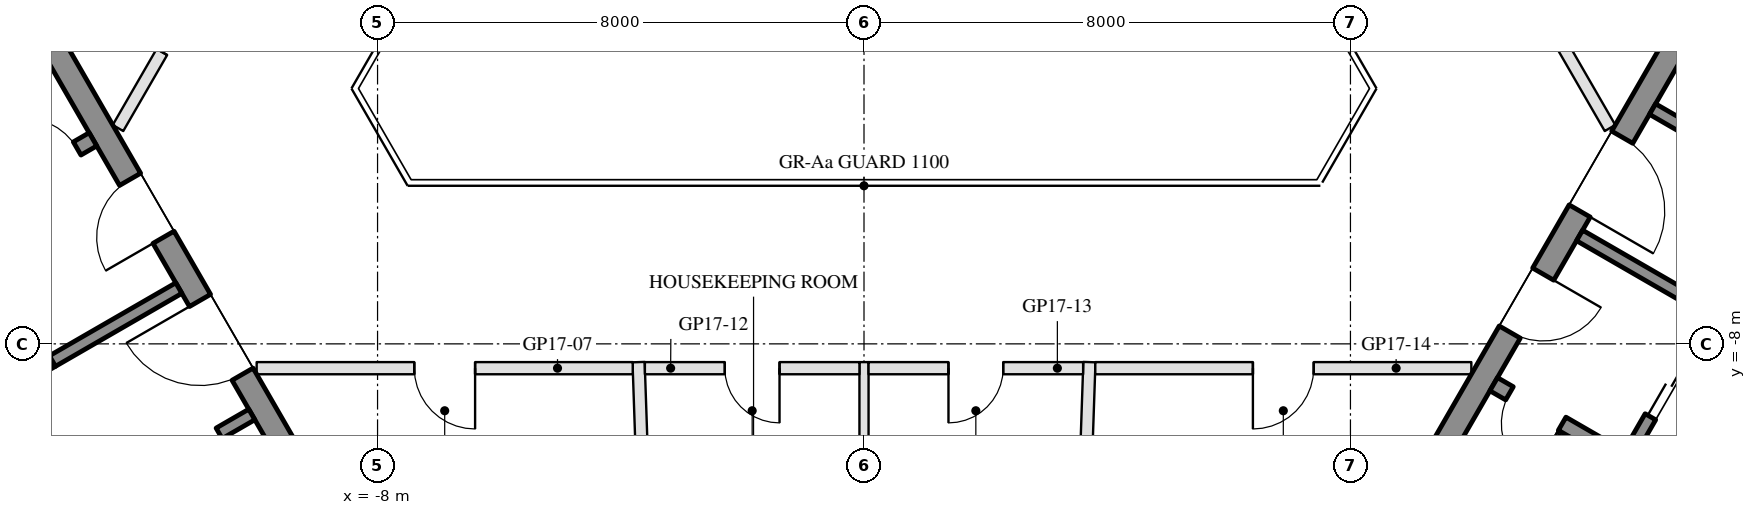
"""IFC4 building model, lengths in metres.
Left out: names, types, materials, properties, quantities, classifications, styles, units other than length and angle.
Written with IfcOpenShell. Run it as: python <this file> out.ifc"""

import sys

from ifc_helpers import new_model, si_unit, direction, frame, frame_2d, origin, place, context, subcontext, project, spatial, rectangle, extrude, element, fill, save


model = new_model("IFC4")
c1 = context("Model", 3, precision=1e-05, world=origin(), true_north=direction((0.0, 1.0)))
c2 = subcontext(c1, "Body", "Model", "MODEL_VIEW")
j1 = project(units=[si_unit("LENGTHUNIT", "METRE"), si_unit("PLANEANGLEUNIT", "RADIAN")], contexts=[c1])
p1 = place(None, origin())
s1 = spatial("IfcSite", under=j1, at=p1, CompositionType="ELEMENT")
p2 = place(p1, origin())
s2 = spatial("IfcBuilding", under=s1, at=p2, CompositionType="ELEMENT")
p3 = place(p2, frame((0.0, 0.0, 187.3)))
s3 = spatial("IfcBuildingStorey", under=s2, at=p3, CompositionType="ELEMENT", Elevation=187.3)
p4 = place(p3, frame((-13.845, -2.22, 0.0), z_axis=(0.0, 0.0, 1.0), x_axis=(0.500004234368, -0.866022959057, 0.0)))
e1 = element("IfcWall", 1, at=p4, inside=s3, PredefinedType="SHEAR", context=c2, shape_type="SweptSolid", body=[
    extrude(rectangle(XDim=10.0, YDim=0.4, at=frame_2d((5.0, 0.0))), origin(), (0.0, 0.0, 1.0), 3.5),
])
p5 = place(p4, frame((3.55, 0.0, 0.0)))
e2 = element("IfcOpeningElement", 2, at=p5, cuts=e1, PredefinedType="OPENING", context=c2, shape_type="SweptSolid", body=[
    extrude(rectangle(XDim=1.1, YDim=2.1, at=frame_2d((0.55, 1.05))), frame((0.0, 0.21, 0.0), z_axis=(0.0, -1.0, 0.0), x_axis=(1.0, 0.0, 0.0)), (0.0, 0.0, 1.0), 0.42),
])
p6 = place(p4, frame((5.85, 0.0, 0.0)))
e3 = element("IfcOpeningElement", 3, at=p6, cuts=e1, PredefinedType="OPENING", context=c2, shape_type="SweptSolid", body=[
    extrude(rectangle(XDim=1.4, YDim=2.1, at=frame_2d((0.7, 1.05))), frame((0.0, 0.21, 0.0), z_axis=(0.0, -1.0, 0.0), x_axis=(1.0, 0.0, 0.0)), (0.0, 0.0, 1.0), 0.42),
])
p7 = place(p3, frame((-12.681, -4.636, 0.0), z_axis=(0.0, 0.0, 1.0), x_axis=(-0.866021702275, -0.500006411147, 0.0)))
e4 = element("IfcWall", 4, at=p7, inside=s3, PredefinedType="SHEAR", context=c2, shape_type="SweptSolid", body=[
    extrude(rectangle(XDim=6.45, YDim=0.25, at=frame_2d((3.225, 0.0))), origin(), (0.0, 0.0, 1.0), 3.5),
])
p8 = place(p7, frame((0.3, 0.0, 0.0)))
e5 = element("IfcOpeningElement", 5, at=p8, cuts=e4, PredefinedType="OPENING", context=c2, shape_type="SweptSolid", body=[
    extrude(rectangle(XDim=1.0, YDim=2.1, at=frame_2d((0.5, 1.05))), frame((0.0, 0.135, 0.0), z_axis=(0.0, -1.0, 0.0), x_axis=(1.0, 0.0, 0.0)), (0.0, 0.0, 1.0), 0.27),
])
p9 = place(p3, frame((-14.783, -5.995, 0.0), z_axis=(0.0, 0.0, 1.0), x_axis=(0.49994636267, -0.866056369097, 0.0)))
e6 = element("IfcWall", 6, at=p9, inside=s3, PredefinedType="SHEAR", context=c2, shape_type="SweptSolid", body=[
    extrude(rectangle(XDim=2.8, YDim=0.2, at=frame_2d((1.4, 0.0))), origin(), (0.0, 0.0, 1.0), 3.5),
])
p10 = place(p9, frame((0.7, 0.0, 0.0)))
e7 = element("IfcOpeningElement", 7, at=p10, cuts=e6, PredefinedType="OPENING", context=c2, shape_type="SweptSolid", body=[
    extrude(rectangle(XDim=1.2, YDim=2.1, at=frame_2d((0.6, 1.05))), frame((0.0, 0.11, 0.0), z_axis=(0.0, -1.0, 0.0), x_axis=(1.0, 0.0, 0.0)), (0.0, 0.0, 1.0), 0.22),
])
p11 = place(p3, frame((-11.268, -7.083, 0.0), z_axis=(0.0, 0.0, 1.0), x_axis=(-0.866050077142, -0.499957262057, 0.0)))
e8 = element("IfcWall", 8, at=p11, inside=s3, PredefinedType="SHEAR", context=c2, shape_type="SweptSolid", body=[
    extrude(rectangle(XDim=2.4, YDim=0.2, at=frame_2d((1.2, 0.0))), origin(), (0.0, 0.0, 1.0), 3.5),
])
p12 = place(p3, frame((-10.068, -9.162, 0.0), z_axis=(0.0, 0.0, 1.0), x_axis=(-0.866032725843, -0.499987317609, 0.0)))
e9 = element("IfcWall", 9, at=p12, inside=s3, PredefinedType="SHEAR", context=c2, shape_type="SweptSolid", body=[
    extrude(rectangle(XDim=10.16, YDim=0.2, at=frame_2d((5.08, 0.0))), origin(), (0.0, 0.0, 1.0), 3.5),
])
p13 = place(p12, frame((0.62, 0.0, 0.0)))
e10 = element("IfcOpeningElement", 10, at=p13, cuts=e9, PredefinedType="OPENING", context=c2, shape_type="SweptSolid", body=[
    extrude(rectangle(XDim=1.1, YDim=2.1, at=frame_2d((0.55, 1.05))), frame((0.0, 0.11, 0.0), z_axis=(0.0, -1.0, 0.0), x_axis=(1.0, 0.0, 0.0)), (0.0, 0.0, 1.0), 0.22),
])
p14 = place(p12, frame((3.16, 0.0, 0.0)))
e11 = element("IfcOpeningElement", 11, at=p14, cuts=e9, PredefinedType="OPENING", context=c2, shape_type="SweptSolid", body=[
    extrude(rectangle(XDim=1.1, YDim=2.1, at=frame_2d((0.55, 1.05))), frame((0.0, 0.11, 0.0), z_axis=(0.0, -1.0, 0.0), x_axis=(1.0, 0.0, 0.0)), (0.0, 0.0, 1.0), 0.22),
])
p15 = place(p12, frame((5.7, 0.0, 0.0)))
e12 = element("IfcOpeningElement", 12, at=p15, cuts=e9, PredefinedType="OPENING", context=c2, shape_type="SweptSolid", body=[
    extrude(rectangle(XDim=1.1, YDim=2.1, at=frame_2d((0.55, 1.05))), frame((0.0, 0.11, 0.0), z_axis=(0.0, -1.0, 0.0), x_axis=(1.0, 0.0, 0.0)), (0.0, 0.0, 1.0), 0.22),
])
p16 = place(p12, frame((8.24, 0.0, 0.0)))
e13 = element("IfcOpeningElement", 13, at=p16, cuts=e9, PredefinedType="OPENING", context=c2, shape_type="SweptSolid", body=[
    extrude(rectangle(XDim=1.1, YDim=2.1, at=frame_2d((0.55, 1.05))), frame((0.0, 0.11, 0.0), z_axis=(0.0, -1.0, 0.0), x_axis=(1.0, 0.0, 0.0)), (0.0, 0.0, 1.0), 0.22),
])
p17 = place(p3, frame((8.845, -10.88, 0.0), z_axis=(0.0, 0.0, 1.0), x_axis=(0.500004234368, 0.866022959057, 0.0)))
e14 = element("IfcWall", 14, at=p17, inside=s3, PredefinedType="SHEAR", context=c2, shape_type="SweptSolid", body=[
    extrude(rectangle(XDim=10.0, YDim=0.4, at=frame_2d((5.0, 0.0))), origin(), (0.0, 0.0, 1.0), 3.5),
])
p18 = place(p17, frame((3.55, 0.0, 0.0)))
e15 = element("IfcOpeningElement", 15, at=p18, cuts=e14, PredefinedType="OPENING", context=c2, shape_type="SweptSolid", body=[
    extrude(rectangle(XDim=1.1, YDim=2.1, at=frame_2d((0.55, 1.05))), frame((0.0, 0.21, 0.0), z_axis=(0.0, -1.0, 0.0), x_axis=(1.0, 0.0, 0.0)), (0.0, 0.0, 1.0), 0.42),
])
p19 = place(p17, frame((5.85, 0.0, 0.0)))
e16 = element("IfcOpeningElement", 16, at=p19, cuts=e14, PredefinedType="OPENING", context=c2, shape_type="SweptSolid", body=[
    extrude(rectangle(XDim=1.4, YDim=2.1, at=frame_2d((0.7, 1.05))), frame((0.0, 0.21, 0.0), z_axis=(0.0, -1.0, 0.0), x_axis=(1.0, 0.0, 0.0)), (0.0, 0.0, 1.0), 0.42),
])
p20 = place(p3, frame((10.356, -8.664, 0.0), z_axis=(0.0, 0.0, 1.0), x_axis=(0.866028629588, -0.499994412703, 0.0)))
e17 = element("IfcWall", 17, at=p20, inside=s3, PredefinedType="SHEAR", context=c2, shape_type="SweptSolid", body=[
    extrude(rectangle(XDim=6.45, YDim=0.25, at=frame_2d((3.225, 0.0))), origin(), (0.0, 0.0, 1.0), 3.5),
])
p21 = place(p20, frame((0.3, 0.0, 0.0)))
e18 = element("IfcOpeningElement", 18, at=p21, cuts=e17, PredefinedType="OPENING", context=c2, shape_type="SweptSolid", body=[
    extrude(rectangle(XDim=1.0, YDim=2.1, at=frame_2d((0.5, 1.05))), frame((0.0, 0.135, 0.0), z_axis=(0.0, -1.0, 0.0), x_axis=(1.0, 0.0, 0.0)), (0.0, 0.0, 1.0), 0.27),
])
p22 = place(p3, frame((12.583, -9.805, 0.0), z_axis=(0.0, 0.0, 1.0), x_axis=(0.49994636267, 0.866056369097, 0.0)))
e19 = element("IfcWall", 19, at=p22, inside=s3, PredefinedType="SHEAR", context=c2, shape_type="SweptSolid", body=[
    extrude(rectangle(XDim=2.8, YDim=0.2, at=frame_2d((1.4, 0.0))), origin(), (0.0, 0.0, 1.0), 3.5),
])
p23 = place(p22, frame((0.7, 0.0, 0.0)))
e20 = element("IfcOpeningElement", 20, at=p23, cuts=e19, PredefinedType="OPENING", context=c2, shape_type="SweptSolid", body=[
    extrude(rectangle(XDim=1.2, YDim=2.1, at=frame_2d((0.6, 1.05))), frame((0.0, 0.11, 0.0), z_axis=(0.0, -1.0, 0.0), x_axis=(1.0, 0.0, 0.0)), (0.0, 0.0, 1.0), 0.22),
])
p24 = place(p3, frame((11.768, -6.217, 0.0), z_axis=(0.0, 0.0, 1.0), x_axis=(0.866050077142, -0.499957262057, 0.0)))
e21 = element("IfcWall", 21, at=p24, inside=s3, PredefinedType="SHEAR", context=c2, shape_type="SweptSolid", body=[
    extrude(rectangle(XDim=2.4, YDim=0.2, at=frame_2d((1.2, 0.0))), origin(), (0.0, 0.0, 1.0), 3.5),
])
p25 = place(p3, frame((12.968, -4.138, 0.0), z_axis=(0.0, 0.0, 1.0), x_axis=(0.866028328073, -0.49999493495, 0.0)))
e22 = element("IfcWall", 22, at=p25, inside=s3, PredefinedType="SHEAR", context=c2, shape_type="SweptSolid", body=[
    extrude(rectangle(XDim=10.16, YDim=0.2, at=frame_2d((5.08, 0.0))), origin(), (0.0, 0.0, 1.0), 3.5),
])
p26 = place(p25, frame((0.72, 0.0, 0.0)))
e23 = element("IfcOpeningElement", 23, at=p26, cuts=e22, PredefinedType="OPENING", context=c2, shape_type="SweptSolid", body=[
    extrude(rectangle(XDim=0.9, YDim=2.1, at=frame_2d((0.45, 1.05))), frame((0.0, 0.11, 0.0), z_axis=(0.0, -1.0, 0.0), x_axis=(1.0, 0.0, 0.0)), (0.0, 0.0, 1.0), 0.22),
])
p27 = place(p25, frame((5.8, 0.0, 0.0)))
e24 = element("IfcOpeningElement", 24, at=p27, cuts=e22, PredefinedType="OPENING", context=c2, shape_type="SweptSolid", body=[
    extrude(rectangle(XDim=0.9, YDim=2.1, at=frame_2d((0.45, 1.05))), frame((0.0, 0.11, 0.0), z_axis=(0.0, -1.0, 0.0), x_axis=(1.0, 0.0, 0.0)), (0.0, 0.0, 1.0), 0.22),
])
p28 = place(p3, frame((-3.361, -18.38, 0.0), z_axis=(0.0, 0.0, 1.0), x_axis=(-0.034300534927, 0.999411563523, 0.0)))
e25 = element("IfcWall", 25, at=p28, inside=s3, PredefinedType="PARTITIONING", context=c2, shape_type="SweptSolid", body=[
    extrude(rectangle(XDim=10.086, YDim=0.2, at=frame_2d((5.043, 0.0))), origin(), (0.0, 0.0, 1.0), 3.06),
])
p29 = place(p3, frame((3.33, -19.28, 0.0), z_axis=(0.0, 0.0, 1.0), x_axis=(0.034288537327, 0.999411975217, 0.0)))
e26 = element("IfcWall", 26, at=p29, inside=s3, PredefinedType="PARTITIONING", context=c2, shape_type="SweptSolid", body=[
    extrude(rectangle(XDim=10.986, YDim=0.2, at=frame_2d((5.493, 0.0))), origin(), (0.0, 0.0, 1.0), 3.06),
])
p30 = place(p3, frame((-3.803, -8.4, 0.0), z_axis=(0.0, 0.0, 1.0), x_axis=(-1.0, 0.0, 0.0)))
e27 = element("IfcWall", 27, at=p30, inside=s3, PredefinedType="PARTITIONING", context=c2, shape_type="SweptSolid", body=[
    extrude(rectangle(XDim=6.185, YDim=0.2, at=frame_2d((3.092, 0.0))), origin(), (0.0, 0.0, 1.0), 2.95),
])
p31 = place(p30, frame((2.592, 0.0, 0.0)))
e28 = element("IfcOpeningElement", 28, at=p31, cuts=e27, PredefinedType="OPENING", context=c2, shape_type="SweptSolid", body=[
    extrude(rectangle(XDim=1.0, YDim=2.1, at=frame_2d((0.5, 1.05))), frame((0.0, 0.11, 0.0), z_axis=(0.0, -1.0, 0.0), x_axis=(1.0, 0.0, 0.0)), (0.0, 0.0, 1.0), 0.22),
])
p32 = place(p3, frame((0.0, -17.855, 0.0), z_axis=(0.0, 0.0, 1.0), x_axis=(0.0, 1.0, 0.0)))
e29 = element("IfcWall", 29, at=p32, inside=s3, PredefinedType="PARTITIONING", context=c2, shape_type="SweptSolid", body=[
    extrude(rectangle(XDim=9.555, YDim=0.15, at=frame_2d((4.777, 0.0))), origin(), (0.0, 0.0, 1.0), 2.95),
])
p33 = place(p3, frame((-0.075, -8.4, 0.0), z_axis=(0.0, 0.0, 1.0), x_axis=(-1.0, 0.0, 0.0)))
e30 = element("IfcWall", 30, at=p33, inside=s3, PredefinedType="PARTITIONING", context=c2, shape_type="SweptSolid", body=[
    extrude(rectangle(XDim=3.529, YDim=0.2, at=frame_2d((1.764, 0.0))), origin(), (0.0, 0.0, 1.0), 2.95),
])
p34 = place(p33, frame((1.314, 0.0, 0.0)))
e31 = element("IfcOpeningElement", 31, at=p34, cuts=e30, PredefinedType="OPENING", context=c2, shape_type="SweptSolid", body=[
    extrude(rectangle(XDim=0.9, YDim=2.1, at=frame_2d((0.45, 1.05))), frame((0.0, 0.11, 0.0), z_axis=(0.0, -1.0, 0.0), x_axis=(1.0, 0.0, 0.0)), (0.0, 0.0, 1.0), 0.22),
])
p35 = place(p3, frame((3.604, -8.4, 0.0), z_axis=(0.0, 0.0, 1.0), x_axis=(-1.0, 0.0, 0.0)))
e32 = element("IfcWall", 32, at=p35, inside=s3, PredefinedType="PARTITIONING", context=c2, shape_type="SweptSolid", body=[
    extrude(rectangle(XDim=3.529, YDim=0.2, at=frame_2d((1.764, 0.0))), origin(), (0.0, 0.0, 1.0), 2.95),
])
p36 = place(p35, frame((1.314, 0.0, 0.0)))
e33 = element("IfcOpeningElement", 33, at=p36, cuts=e32, PredefinedType="OPENING", context=c2, shape_type="SweptSolid", body=[
    extrude(rectangle(XDim=0.9, YDim=2.1, at=frame_2d((0.45, 1.05))), frame((0.0, 0.11, 0.0), z_axis=(0.0, -1.0, 0.0), x_axis=(1.0, 0.0, 0.0)), (0.0, 0.0, 1.0), 0.22),
])
p37 = place(p3, frame((9.988, -8.4, 0.0), z_axis=(0.0, 0.0, 1.0), x_axis=(-1.0, 0.0, 0.0)))
e34 = element("IfcWall", 34, at=p37, inside=s3, PredefinedType="PARTITIONING", context=c2, shape_type="SweptSolid", body=[
    extrude(rectangle(XDim=6.185, YDim=0.2, at=frame_2d((3.092, 0.0))), origin(), (0.0, 0.0, 1.0), 2.95),
])
p38 = place(p37, frame((2.592, 0.0, 0.0)))
e35 = element("IfcOpeningElement", 35, at=p38, cuts=e34, PredefinedType="OPENING", context=c2, shape_type="SweptSolid", body=[
    extrude(rectangle(XDim=1.0, YDim=2.1, at=frame_2d((0.5, 1.05))), frame((0.0, 0.11, 0.0), z_axis=(0.0, -1.0, 0.0), x_axis=(1.0, 0.0, 0.0)), (0.0, 0.0, 1.0), 0.22),
])
p39 = place(p3, frame((9.725, -0.043, 0.0), z_axis=(0.0, 0.0, 1.0), x_axis=(0.500014573982, -0.866016989329, 0.0)))
e36 = element("IfcWall", 36, at=p39, inside=s3, PredefinedType="PARTITIONING", context=c2, shape_type="SweptSolid", body=[
    extrude(rectangle(XDim=5.088, YDim=0.2, at=frame_2d((2.544, 0.0))), origin(), (0.0, 0.0, 1.0), 2.95),
])
p40 = place(p39, frame((2.044, 0.0, 0.0)))
e37 = element("IfcOpeningElement", 37, at=p40, cuts=e36, PredefinedType="OPENING", context=c2, shape_type="SweptSolid", body=[
    extrude(rectangle(XDim=1.0, YDim=2.1, at=frame_2d((0.5, 1.05))), frame((0.0, 0.11, 0.0), z_axis=(0.0, -1.0, 0.0), x_axis=(1.0, 0.0, 0.0)), (0.0, 0.0, 1.0), 0.22),
])
p41 = place(p3, frame((-12.269, -4.45, 0.0), z_axis=(0.0, 0.0, 1.0), x_axis=(0.500008716408, 0.866020371305, 0.0)))
e38 = element("IfcWall", 38, at=p41, inside=s3, PredefinedType="PARTITIONING", context=c2, shape_type="SweptSolid", body=[
    extrude(rectangle(XDim=3.888, YDim=0.2, at=frame_2d((1.944, 0.0))), origin(), (0.0, 0.0, 1.0), 2.95),
])
p42 = place(p41, frame((1.444, 0.0, 0.0)))
e39 = element("IfcOpeningElement", 39, at=p42, cuts=e38, PredefinedType="OPENING", context=c2, shape_type="SweptSolid", body=[
    extrude(rectangle(XDim=1.0, YDim=2.1, at=frame_2d((0.5, 1.05))), frame((0.0, 0.11, 0.0), z_axis=(0.0, -1.0, 0.0), x_axis=(1.0, 0.0, 0.0)), (0.0, 0.0, 1.0), 0.22),
])
p43 = place(p13, origin())
e40 = element("IfcDoor", 40, at=p43, inside=s3, OperationType="DOUBLE_DOOR_SLIDING", PredefinedType="DOOR", context=c2, shape_type="SweptSolid", body=[
    extrude(rectangle(XDim=1.1, YDim=2.1, at=frame_2d((0.55, 1.05))), frame((0.0, 0.025, 0.0), z_axis=(0.0, -1.0, 0.0), x_axis=(1.0, 0.0, 0.0)), (0.0, 0.0, 1.0), 0.05),
])
fill(e10, e40)
p44 = place(p5, frame((1.1, 0.0, 0.0), z_axis=(0.0, 0.0, 1.0), x_axis=(-1.0, 0.0, 0.0)))
e41 = element("IfcDoor", 41, at=p44, inside=s3, OperationType="SINGLE_SWING_LEFT", PredefinedType="DOOR", context=c2, shape_type="SweptSolid", body=[
    extrude(rectangle(XDim=1.1, YDim=2.1, at=frame_2d((0.55, 1.05))), frame((0.0, 0.025, 0.0), z_axis=(0.0, -1.0, 0.0), x_axis=(1.0, 0.0, 0.0)), (0.0, 0.0, 1.0), 0.05),
])
fill(e2, e41)
p45 = place(p6, frame((1.4, 0.0, 0.0), z_axis=(0.0, 0.0, 1.0), x_axis=(-1.0, 0.0, 0.0)))
e42 = element("IfcDoor", 42, at=p45, inside=s3, OperationType="DOUBLE_DOOR_SINGLE_SWING", PredefinedType="DOOR", context=c2, shape_type="SweptSolid", body=[
    extrude(rectangle(XDim=1.4, YDim=2.1, at=frame_2d((0.7, 1.05))), frame((0.0, 0.025, 0.0), z_axis=(0.0, -1.0, 0.0), x_axis=(1.0, 0.0, 0.0)), (0.0, 0.0, 1.0), 0.05),
])
fill(e3, e42)
p46 = place(p8, frame((1.0, 0.0, 0.0), z_axis=(0.0, 0.0, 1.0), x_axis=(-1.0, 0.0, 0.0)))
e43 = element("IfcDoor", 43, at=p46, inside=s3, OperationType="SINGLE_SWING_LEFT", PredefinedType="DOOR", context=c2, shape_type="SweptSolid", body=[
    extrude(rectangle(XDim=1.0, YDim=2.1, at=frame_2d((0.5, 1.05))), frame((0.0, 0.025, 0.0), z_axis=(0.0, -1.0, 0.0), x_axis=(1.0, 0.0, 0.0)), (0.0, 0.0, 1.0), 0.05),
])
fill(e5, e43)
p47 = place(p23, origin())
e44 = element("IfcDoor", 44, at=p47, inside=s3, OperationType="DOUBLE_DOOR_SLIDING", PredefinedType="DOOR", context=c2, shape_type="SweptSolid", body=[
    extrude(rectangle(XDim=1.2, YDim=2.1, at=frame_2d((0.6, 1.05))), frame((0.0, 0.025, 0.0), z_axis=(0.0, -1.0, 0.0), x_axis=(1.0, 0.0, 0.0)), (0.0, 0.0, 1.0), 0.05),
])
fill(e20, e44)
p48 = place(p18, frame((1.1, 0.0, 0.0), z_axis=(0.0, 0.0, 1.0), x_axis=(-1.0, 0.0, 0.0)))
e45 = element("IfcDoor", 45, at=p48, inside=s3, OperationType="SINGLE_SWING_LEFT", PredefinedType="DOOR", context=c2, shape_type="SweptSolid", body=[
    extrude(rectangle(XDim=1.1, YDim=2.1, at=frame_2d((0.55, 1.05))), frame((0.0, 0.025, 0.0), z_axis=(0.0, -1.0, 0.0), x_axis=(1.0, 0.0, 0.0)), (0.0, 0.0, 1.0), 0.05),
])
fill(e15, e45)
p49 = place(p19, frame((1.4, 0.0, 0.0), z_axis=(0.0, 0.0, 1.0), x_axis=(-1.0, 0.0, 0.0)))
e46 = element("IfcDoor", 46, at=p49, inside=s3, OperationType="DOUBLE_DOOR_SINGLE_SWING", PredefinedType="DOOR", context=c2, shape_type="SweptSolid", body=[
    extrude(rectangle(XDim=1.4, YDim=2.1, at=frame_2d((0.7, 1.05))), frame((0.0, 0.025, 0.0), z_axis=(0.0, -1.0, 0.0), x_axis=(1.0, 0.0, 0.0)), (0.0, 0.0, 1.0), 0.05),
])
fill(e16, e46)
p50 = place(p21, frame((1.0, 0.0, 0.0), z_axis=(0.0, 0.0, 1.0), x_axis=(-1.0, 0.0, 0.0)))
e47 = element("IfcDoor", 47, at=p50, inside=s3, OperationType="SINGLE_SWING_LEFT", PredefinedType="DOOR", context=c2, shape_type="SweptSolid", body=[
    extrude(rectangle(XDim=1.0, YDim=2.1, at=frame_2d((0.5, 1.05))), frame((0.0, 0.025, 0.0), z_axis=(0.0, -1.0, 0.0), x_axis=(1.0, 0.0, 0.0)), (0.0, 0.0, 1.0), 0.05),
])
fill(e18, e47)
p51 = place(p31, origin())
e48 = element("IfcDoor", 48, at=p51, inside=s3, OperationType="SINGLE_SWING_LEFT", PredefinedType="DOOR", context=c2, shape_type="SweptSolid", body=[
    extrude(rectangle(XDim=1.0, YDim=2.1, at=frame_2d((0.5, 1.05))), frame((0.0, 0.025, 0.0), z_axis=(0.0, -1.0, 0.0), x_axis=(1.0, 0.0, 0.0)), (0.0, 0.0, 1.0), 0.05),
])
fill(e28, e48)
p52 = place(p34, origin())
e49 = element("IfcDoor", 49, at=p52, inside=s3, OperationType="SINGLE_SWING_LEFT", PredefinedType="DOOR", context=c2, shape_type="SweptSolid", body=[
    extrude(rectangle(XDim=0.9, YDim=2.1, at=frame_2d((0.45, 1.05))), frame((0.0, 0.025, 0.0), z_axis=(0.0, -1.0, 0.0), x_axis=(1.0, 0.0, 0.0)), (0.0, 0.0, 1.0), 0.05),
])
fill(e31, e49)
p53 = place(p36, origin())
e50 = element("IfcDoor", 50, at=p53, inside=s3, OperationType="SINGLE_SWING_RIGHT", PredefinedType="DOOR", context=c2, shape_type="SweptSolid", body=[
    extrude(rectangle(XDim=0.9, YDim=2.1, at=frame_2d((0.45, 1.05))), frame((0.0, 0.025, 0.0), z_axis=(0.0, -1.0, 0.0), x_axis=(1.0, 0.0, 0.0)), (0.0, 0.0, 1.0), 0.05),
])
fill(e33, e50)
p54 = place(p38, origin())
e51 = element("IfcDoor", 51, at=p54, inside=s3, OperationType="SINGLE_SWING_RIGHT", PredefinedType="DOOR", context=c2, shape_type="SweptSolid", body=[
    extrude(rectangle(XDim=1.0, YDim=2.1, at=frame_2d((0.5, 1.05))), frame((0.0, 0.025, 0.0), z_axis=(0.0, -1.0, 0.0), x_axis=(1.0, 0.0, 0.0)), (0.0, 0.0, 1.0), 0.05),
])
fill(e35, e51)
p55 = place(p42, origin())
e52 = element("IfcDoor", 52, at=p55, inside=s3, OperationType="SINGLE_SWING_RIGHT", PredefinedType="DOOR", context=c2, shape_type="SweptSolid", body=[
    extrude(rectangle(XDim=1.0, YDim=2.1, at=frame_2d((0.5, 1.05))), frame((0.0, 0.025, 0.0), z_axis=(0.0, -1.0, 0.0), x_axis=(1.0, 0.0, 0.0)), (0.0, 0.0, 1.0), 0.05),
])
fill(e39, e52)
save(model, sys.argv[1])
